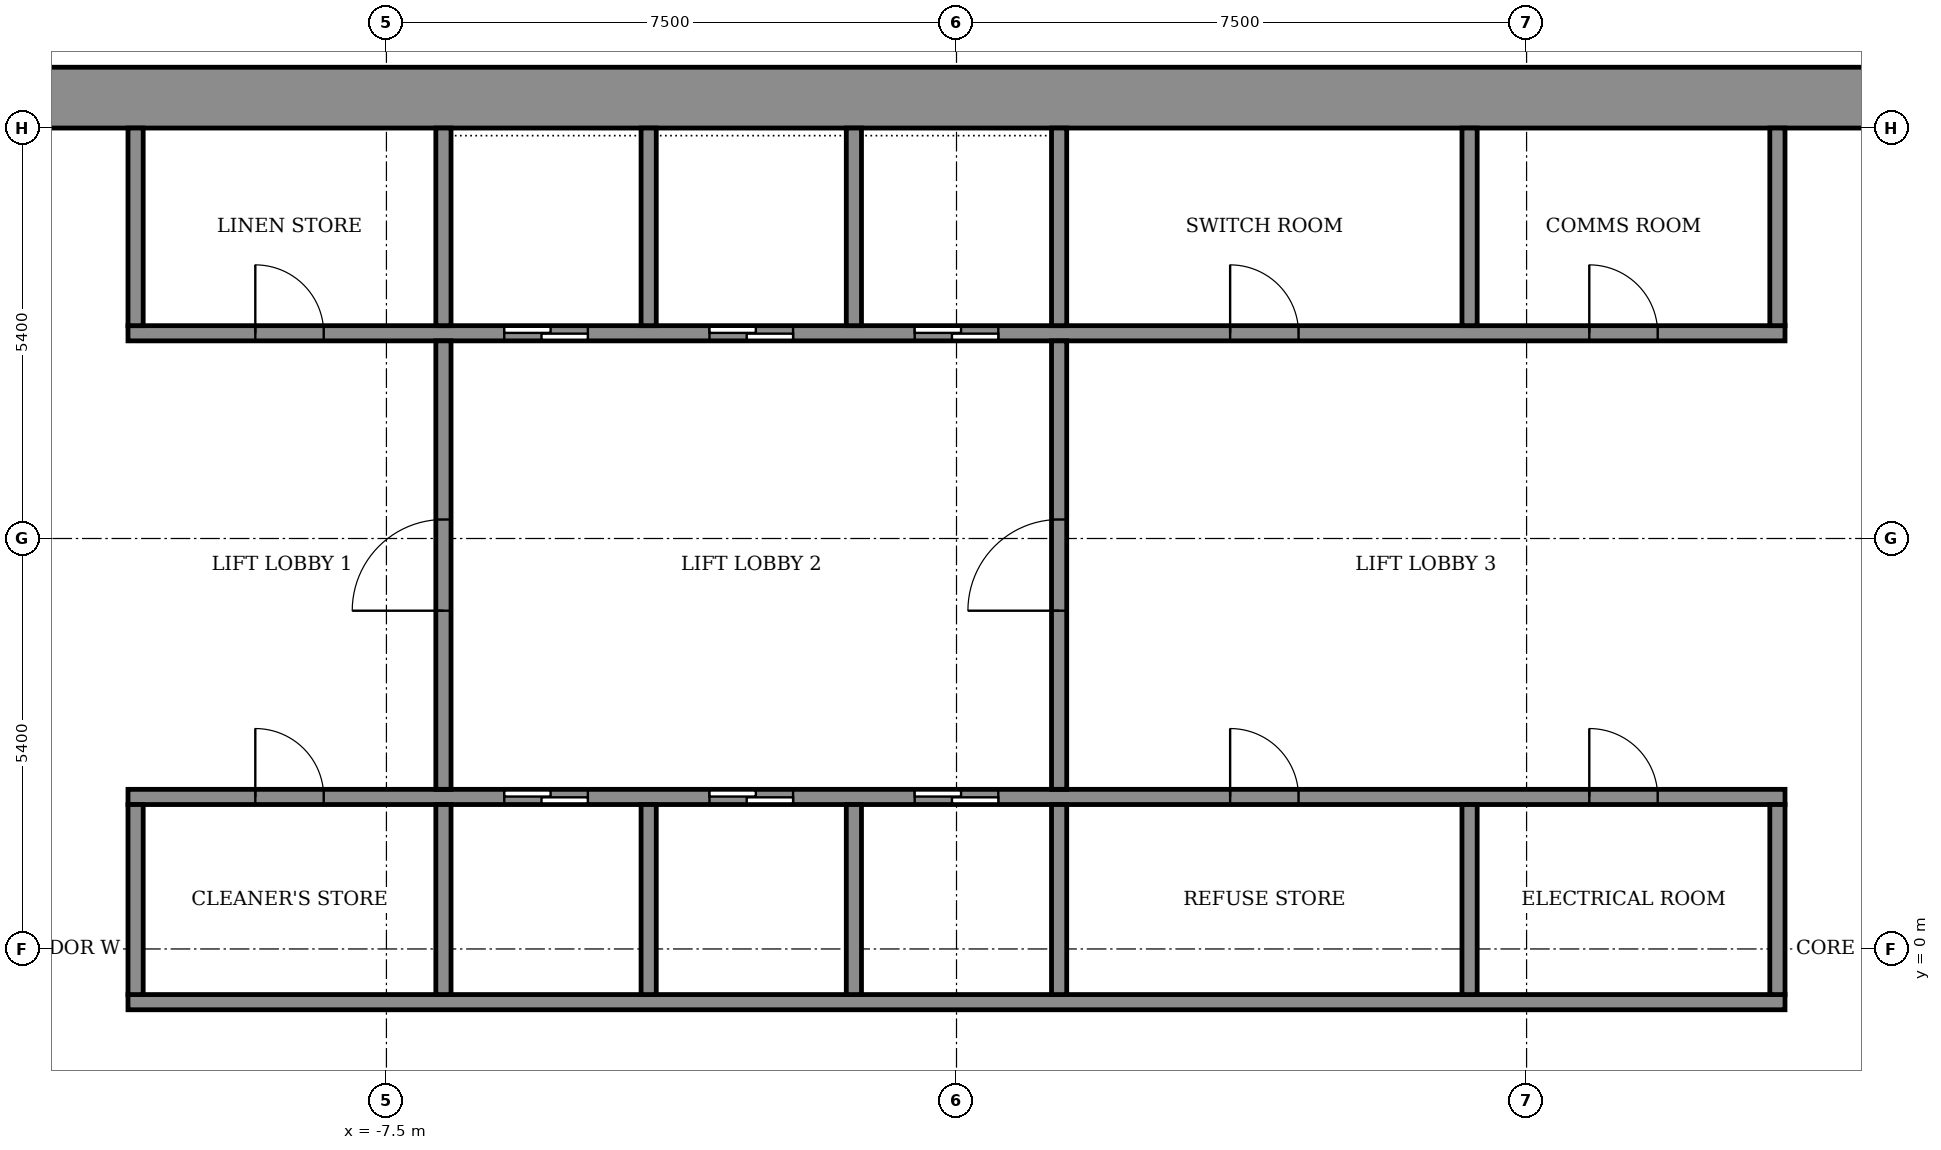
"""IFC4 building model, lengths in metres.
Left out: names, types, materials, properties, quantities, classifications, styles, units other than length and angle.
Written with IfcOpenShell. Run it as: python <this file> out.ifc"""

import sys

from ifc_helpers import new_model, si_unit, direction, frame, frame_2d, origin, place, context, subcontext, project, spatial, rectangle, extrude, element, fill, save


model = new_model("IFC4")
c1 = context("Model", 3, precision=1e-05, world=origin(), true_north=direction((0.0, 1.0)))
c2 = subcontext(c1, "Body", "Model", "MODEL_VIEW")
j1 = project(units=[si_unit("LENGTHUNIT", "METRE"), si_unit("PLANEANGLEUNIT", "RADIAN")], contexts=[c1])
p1 = place(None, origin())
s1 = spatial("IfcSite", under=j1, at=p1, CompositionType="ELEMENT")
p2 = place(p1, origin())
s2 = spatial("IfcBuilding", under=s1, at=p2, CompositionType="ELEMENT")
p3 = place(p2, frame((0.0, 0.0, 241.9)))
s3 = spatial("IfcBuildingStorey", under=s2, at=p3, CompositionType="ELEMENT", Elevation=241.9)
p4 = place(p3, frame((-14.6, 11.2, 0.0), z_axis=(0.0, 0.0, 1.0), x_axis=(1.0, 0.0, 0.0)))
e1 = element("IfcWall", 1, at=p4, inside=s3, PredefinedType="SHEAR", context=c2, shape_type="SweptSolid", body=[
    extrude(rectangle(XDim=29.2, YDim=0.8, at=frame_2d((14.6, 0.0))), origin(), (0.0, 0.0, 1.0), 3.6),
])
p5 = place(p3, frame((-10.9, -0.7, 0.0), z_axis=(0.0, 0.0, 1.0), x_axis=(1.0, 0.0, 0.0)))
e2 = element("IfcWall", 2, at=p5, inside=s3, PredefinedType="SHEAR", context=c2, shape_type="SweptSolid", body=[
    extrude(rectangle(XDim=21.8, YDim=0.2, at=frame_2d((10.9, 0.0))), origin(), (0.0, 0.0, 1.0), 3.05),
])
p6 = place(p3, frame((-10.9, 2.0, 0.0), z_axis=(0.0, 0.0, 1.0), x_axis=(1.0, 0.0, 0.0)))
e3 = element("IfcWall", 3, at=p6, inside=s3, PredefinedType="SHEAR", context=c2, shape_type="SweptSolid", body=[
    extrude(rectangle(XDim=21.8, YDim=0.2, at=frame_2d((10.9, 0.0))), origin(), (0.0, 0.0, 1.0), 3.05),
])
p7 = place(p6, frame((4.95, 0.0, 0.0)))
e4 = element("IfcOpeningElement", 4, at=p7, cuts=e3, PredefinedType="OPENING", context=c2, shape_type="SweptSolid", body=[
    extrude(rectangle(XDim=1.1, YDim=2.1, at=frame_2d((0.55, 1.05))), frame((0.0, 0.11, 0.0), z_axis=(0.0, -1.0, 0.0), x_axis=(1.0, 0.0, 0.0)), (0.0, 0.0, 1.0), 0.22),
])
p8 = place(p6, frame((7.65, 0.0, 0.0)))
e5 = element("IfcOpeningElement", 5, at=p8, cuts=e3, PredefinedType="OPENING", context=c2, shape_type="SweptSolid", body=[
    extrude(rectangle(XDim=1.1, YDim=2.1, at=frame_2d((0.55, 1.05))), frame((0.0, 0.11, 0.0), z_axis=(0.0, -1.0, 0.0), x_axis=(1.0, 0.0, 0.0)), (0.0, 0.0, 1.0), 0.22),
])
p9 = place(p6, frame((10.35, 0.0, 0.0)))
e6 = element("IfcOpeningElement", 6, at=p9, cuts=e3, PredefinedType="OPENING", context=c2, shape_type="SweptSolid", body=[
    extrude(rectangle(XDim=1.1, YDim=2.1, at=frame_2d((0.55, 1.05))), frame((0.0, 0.11, 0.0), z_axis=(0.0, -1.0, 0.0), x_axis=(1.0, 0.0, 0.0)), (0.0, 0.0, 1.0), 0.22),
])
p10 = place(p6, frame((1.675, 0.0, 0.0)))
e7 = element("IfcOpeningElement", 7, at=p10, cuts=e3, PredefinedType="OPENING", context=c2, shape_type="SweptSolid", body=[
    extrude(rectangle(XDim=0.9, YDim=2.1, at=frame_2d((0.45, 1.05))), frame((0.0, 0.11, 0.0), z_axis=(0.0, -1.0, 0.0), x_axis=(1.0, 0.0, 0.0)), (0.0, 0.0, 1.0), 0.22),
])
p11 = place(p6, frame((14.5, 0.0, 0.0)))
e8 = element("IfcOpeningElement", 8, at=p11, cuts=e3, PredefinedType="OPENING", context=c2, shape_type="SweptSolid", body=[
    extrude(rectangle(XDim=0.9, YDim=2.1, at=frame_2d((0.45, 1.05))), frame((0.0, 0.11, 0.0), z_axis=(0.0, -1.0, 0.0), x_axis=(1.0, 0.0, 0.0)), (0.0, 0.0, 1.0), 0.22),
])
p12 = place(p6, frame((19.225, 0.0, 0.0)))
e9 = element("IfcOpeningElement", 9, at=p12, cuts=e3, PredefinedType="OPENING", context=c2, shape_type="SweptSolid", body=[
    extrude(rectangle(XDim=0.9, YDim=2.1, at=frame_2d((0.45, 1.05))), frame((0.0, 0.11, 0.0), z_axis=(0.0, -1.0, 0.0), x_axis=(1.0, 0.0, 0.0)), (0.0, 0.0, 1.0), 0.22),
])
p13 = place(p3, frame((-10.9, 8.1, 0.0), z_axis=(0.0, 0.0, 1.0), x_axis=(1.0, 0.0, 0.0)))
e10 = element("IfcWall", 10, at=p13, inside=s3, PredefinedType="SHEAR", context=c2, shape_type="SweptSolid", body=[
    extrude(rectangle(XDim=21.8, YDim=0.2, at=frame_2d((10.9, 0.0))), origin(), (0.0, 0.0, 1.0), 3.05),
])
p14 = place(p13, frame((4.95, 0.0, 0.0)))
e11 = element("IfcOpeningElement", 11, at=p14, cuts=e10, PredefinedType="OPENING", context=c2, shape_type="SweptSolid", body=[
    extrude(rectangle(XDim=1.1, YDim=2.1, at=frame_2d((0.55, 1.05))), frame((0.0, 0.11, 0.0), z_axis=(0.0, -1.0, 0.0), x_axis=(1.0, 0.0, 0.0)), (0.0, 0.0, 1.0), 0.22),
])
p15 = place(p13, frame((7.65, 0.0, 0.0)))
e12 = element("IfcOpeningElement", 12, at=p15, cuts=e10, PredefinedType="OPENING", context=c2, shape_type="SweptSolid", body=[
    extrude(rectangle(XDim=1.1, YDim=2.1, at=frame_2d((0.55, 1.05))), frame((0.0, 0.11, 0.0), z_axis=(0.0, -1.0, 0.0), x_axis=(1.0, 0.0, 0.0)), (0.0, 0.0, 1.0), 0.22),
])
p16 = place(p13, frame((10.35, 0.0, 0.0)))
e13 = element("IfcOpeningElement", 13, at=p16, cuts=e10, PredefinedType="OPENING", context=c2, shape_type="SweptSolid", body=[
    extrude(rectangle(XDim=1.1, YDim=2.1, at=frame_2d((0.55, 1.05))), frame((0.0, 0.11, 0.0), z_axis=(0.0, -1.0, 0.0), x_axis=(1.0, 0.0, 0.0)), (0.0, 0.0, 1.0), 0.22),
])
p17 = place(p13, frame((1.675, 0.0, 0.0)))
e14 = element("IfcOpeningElement", 14, at=p17, cuts=e10, PredefinedType="OPENING", context=c2, shape_type="SweptSolid", body=[
    extrude(rectangle(XDim=0.9, YDim=2.1, at=frame_2d((0.45, 1.05))), frame((0.0, 0.11, 0.0), z_axis=(0.0, -1.0, 0.0), x_axis=(1.0, 0.0, 0.0)), (0.0, 0.0, 1.0), 0.22),
])
p18 = place(p13, frame((14.5, 0.0, 0.0)))
e15 = element("IfcOpeningElement", 15, at=p18, cuts=e10, PredefinedType="OPENING", context=c2, shape_type="SweptSolid", body=[
    extrude(rectangle(XDim=0.9, YDim=2.1, at=frame_2d((0.45, 1.05))), frame((0.0, 0.11, 0.0), z_axis=(0.0, -1.0, 0.0), x_axis=(1.0, 0.0, 0.0)), (0.0, 0.0, 1.0), 0.22),
])
p19 = place(p13, frame((19.225, 0.0, 0.0)))
e16 = element("IfcOpeningElement", 16, at=p19, cuts=e10, PredefinedType="OPENING", context=c2, shape_type="SweptSolid", body=[
    extrude(rectangle(XDim=0.9, YDim=2.1, at=frame_2d((0.45, 1.05))), frame((0.0, 0.11, 0.0), z_axis=(0.0, -1.0, 0.0), x_axis=(1.0, 0.0, 0.0)), (0.0, 0.0, 1.0), 0.22),
])
p20 = place(p3, frame((-10.8, -0.6, 0.0), z_axis=(0.0, 0.0, 1.0), x_axis=(0.0, 1.0, 0.0)))
e17 = element("IfcWall", 17, at=p20, inside=s3, PredefinedType="STANDARD", context=c2, shape_type="SweptSolid", body=[
    extrude(rectangle(XDim=2.5, YDim=0.2, at=frame_2d((1.25, 0.0))), origin(), (0.0, 0.0, 1.0), 3.05),
])
for number, where, z_axis, x_axis in (
    (18, (-6.75, -0.6, 0.0), (0.0, 0.0, 1.0), (0.0, 1.0, 0.0)),
    (19, (-4.05, -0.6, 0.0), (0.0, 0.0, 1.0), (0.0, 1.0, 0.0)),
    (20, (-1.35, -0.6, 0.0), (0.0, 0.0, 1.0), (0.0, 1.0, 0.0)),
    (21, (1.35, -0.6, 0.0), (0.0, 0.0, 1.0), (0.0, 1.0, 0.0)),
):
    element("IfcWall", number, at=place(p3, frame(where, z_axis=z_axis, x_axis=x_axis)), inside=s3, PredefinedType="SHEAR", context=c2, shape_type="SweptSolid", body=[
        extrude(rectangle(XDim=2.5, YDim=0.2, at=frame_2d((1.25, 0.0))), origin(), (0.0, 0.0, 1.0), 3.05),
    ])
for number, where, z_axis, x_axis in (
    (22, (6.75, -0.6, 0.0), (0.0, 0.0, 1.0), (0.0, 1.0, 0.0)),
    (23, (10.8, -0.6, 0.0), (0.0, 0.0, 1.0), (0.0, 1.0, 0.0)),
):
    element("IfcWall", number, at=place(p3, frame(where, z_axis=z_axis, x_axis=x_axis)), inside=s3, PredefinedType="STANDARD", context=c2, shape_type="SweptSolid", body=[
        extrude(rectangle(XDim=2.5, YDim=0.2, at=frame_2d((1.25, 0.0))), origin(), (0.0, 0.0, 1.0), 3.05),
    ])
p21 = place(p3, frame((-10.8, 8.2, 0.0), z_axis=(0.0, 0.0, 1.0), x_axis=(0.0, 1.0, 0.0)))
e24 = element("IfcWall", 24, at=p21, inside=s3, PredefinedType="STANDARD", context=c2, shape_type="SweptSolid", body=[
    extrude(rectangle(XDim=2.6, YDim=0.2, at=frame_2d((1.3, 0.0))), origin(), (0.0, 0.0, 1.0), 3.05),
])
for number, where, z_axis, x_axis in (
    (25, (-6.75, 8.2, 0.0), (0.0, 0.0, 1.0), (0.0, 1.0, 0.0)),
    (26, (-4.05, 8.2, 0.0), (0.0, 0.0, 1.0), (0.0, 1.0, 0.0)),
    (27, (-1.35, 8.2, 0.0), (0.0, 0.0, 1.0), (0.0, 1.0, 0.0)),
    (28, (1.35, 8.2, 0.0), (0.0, 0.0, 1.0), (0.0, 1.0, 0.0)),
):
    element("IfcWall", number, at=place(p3, frame(where, z_axis=z_axis, x_axis=x_axis)), inside=s3, PredefinedType="SHEAR", context=c2, shape_type="SweptSolid", body=[
        extrude(rectangle(XDim=2.6, YDim=0.2, at=frame_2d((1.3, 0.0))), origin(), (0.0, 0.0, 1.0), 3.05),
    ])
for number, where, z_axis, x_axis in (
    (29, (6.75, 8.2, 0.0), (0.0, 0.0, 1.0), (0.0, 1.0, 0.0)),
    (30, (10.8, 8.2, 0.0), (0.0, 0.0, 1.0), (0.0, 1.0, 0.0)),
):
    element("IfcWall", number, at=place(p3, frame(where, z_axis=z_axis, x_axis=x_axis)), inside=s3, PredefinedType="STANDARD", context=c2, shape_type="SweptSolid", body=[
        extrude(rectangle(XDim=2.6, YDim=0.2, at=frame_2d((1.3, 0.0))), origin(), (0.0, 0.0, 1.0), 3.05),
    ])
p22 = place(p3, frame((-6.75, 2.1, 0.0), z_axis=(0.0, 0.0, 1.0), x_axis=(0.0, 1.0, 0.0)))
e31 = element("IfcWall", 31, at=p22, inside=s3, PredefinedType="STANDARD", context=c2, shape_type="SweptSolid", body=[
    extrude(rectangle(XDim=5.9, YDim=0.2, at=frame_2d((2.95, 0.0))), origin(), (0.0, 0.0, 1.0), 3.05),
])
p23 = place(p22, frame((2.35, 0.0, 0.0)))
e32 = element("IfcOpeningElement", 32, at=p23, cuts=e31, PredefinedType="OPENING", context=c2, shape_type="SweptSolid", body=[
    extrude(rectangle(XDim=1.2, YDim=2.1, at=frame_2d((0.6, 1.05))), frame((0.0, 0.11, 0.0), z_axis=(0.0, -1.0, 0.0), x_axis=(1.0, 0.0, 0.0)), (0.0, 0.0, 1.0), 0.22),
])
p24 = place(p3, frame((1.35, 2.1, 0.0), z_axis=(0.0, 0.0, 1.0), x_axis=(0.0, 1.0, 0.0)))
e33 = element("IfcWall", 33, at=p24, inside=s3, PredefinedType="STANDARD", context=c2, shape_type="SweptSolid", body=[
    extrude(rectangle(XDim=5.9, YDim=0.2, at=frame_2d((2.95, 0.0))), origin(), (0.0, 0.0, 1.0), 3.05),
])
p25 = place(p24, frame((2.35, 0.0, 0.0)))
e34 = element("IfcOpeningElement", 34, at=p25, cuts=e33, PredefinedType="OPENING", context=c2, shape_type="SweptSolid", body=[
    extrude(rectangle(XDim=1.2, YDim=2.1, at=frame_2d((0.6, 1.05))), frame((0.0, 0.11, 0.0), z_axis=(0.0, -1.0, 0.0), x_axis=(1.0, 0.0, 0.0)), (0.0, 0.0, 1.0), 0.22),
])
p26 = place(p7, origin())
e35 = element("IfcDoor", 35, at=p26, inside=s3, OperationType="SLIDING_TO_LEFT", PredefinedType="DOOR", context=c2, shape_type="SweptSolid", body=[
    extrude(rectangle(XDim=1.1, YDim=2.1, at=frame_2d((0.55, 1.05))), frame((0.0, 0.025, 0.0), z_axis=(0.0, -1.0, 0.0), x_axis=(1.0, 0.0, 0.0)), (0.0, 0.0, 1.0), 0.05),
])
fill(e4, e35)
p27 = place(p8, origin())
e36 = element("IfcDoor", 36, at=p27, inside=s3, OperationType="SLIDING_TO_LEFT", PredefinedType="DOOR", context=c2, shape_type="SweptSolid", body=[
    extrude(rectangle(XDim=1.1, YDim=2.1, at=frame_2d((0.55, 1.05))), frame((0.0, 0.025, 0.0), z_axis=(0.0, -1.0, 0.0), x_axis=(1.0, 0.0, 0.0)), (0.0, 0.0, 1.0), 0.05),
])
fill(e5, e36)
p28 = place(p9, origin())
e37 = element("IfcDoor", 37, at=p28, inside=s3, OperationType="SLIDING_TO_LEFT", PredefinedType="DOOR", context=c2, shape_type="SweptSolid", body=[
    extrude(rectangle(XDim=1.1, YDim=2.1, at=frame_2d((0.55, 1.05))), frame((0.0, 0.025, 0.0), z_axis=(0.0, -1.0, 0.0), x_axis=(1.0, 0.0, 0.0)), (0.0, 0.0, 1.0), 0.05),
])
fill(e6, e37)
p29 = place(p14, origin())
e38 = element("IfcDoor", 38, at=p29, inside=s3, OperationType="SLIDING_TO_LEFT", PredefinedType="DOOR", context=c2, shape_type="SweptSolid", body=[
    extrude(rectangle(XDim=1.1, YDim=2.1, at=frame_2d((0.55, 1.05))), frame((0.0, 0.025, 0.0), z_axis=(0.0, -1.0, 0.0), x_axis=(1.0, 0.0, 0.0)), (0.0, 0.0, 1.0), 0.05),
])
fill(e11, e38)
p30 = place(p15, origin())
e39 = element("IfcDoor", 39, at=p30, inside=s3, OperationType="SLIDING_TO_LEFT", PredefinedType="DOOR", context=c2, shape_type="SweptSolid", body=[
    extrude(rectangle(XDim=1.1, YDim=2.1, at=frame_2d((0.55, 1.05))), frame((0.0, 0.025, 0.0), z_axis=(0.0, -1.0, 0.0), x_axis=(1.0, 0.0, 0.0)), (0.0, 0.0, 1.0), 0.05),
])
fill(e12, e39)
p31 = place(p16, origin())
e40 = element("IfcDoor", 40, at=p31, inside=s3, OperationType="SLIDING_TO_LEFT", PredefinedType="DOOR", context=c2, shape_type="SweptSolid", body=[
    extrude(rectangle(XDim=1.1, YDim=2.1, at=frame_2d((0.55, 1.05))), frame((0.0, 0.025, 0.0), z_axis=(0.0, -1.0, 0.0), x_axis=(1.0, 0.0, 0.0)), (0.0, 0.0, 1.0), 0.05),
])
fill(e13, e40)
p32 = place(p10, origin())
e41 = element("IfcDoor", 41, at=p32, inside=s3, OperationType="SINGLE_SWING_RIGHT", PredefinedType="DOOR", context=c2, shape_type="SweptSolid", body=[
    extrude(rectangle(XDim=0.9, YDim=2.1, at=frame_2d((0.45, 1.05))), frame((0.0, 0.025, 0.0), z_axis=(0.0, -1.0, 0.0), x_axis=(1.0, 0.0, 0.0)), (0.0, 0.0, 1.0), 0.05),
])
fill(e7, e41)
p33 = place(p11, origin())
e42 = element("IfcDoor", 42, at=p33, inside=s3, OperationType="SINGLE_SWING_RIGHT", PredefinedType="DOOR", context=c2, shape_type="SweptSolid", body=[
    extrude(rectangle(XDim=0.9, YDim=2.1, at=frame_2d((0.45, 1.05))), frame((0.0, 0.025, 0.0), z_axis=(0.0, -1.0, 0.0), x_axis=(1.0, 0.0, 0.0)), (0.0, 0.0, 1.0), 0.05),
])
fill(e8, e42)
p34 = place(p12, origin())
e43 = element("IfcDoor", 43, at=p34, inside=s3, OperationType="SINGLE_SWING_LEFT", PredefinedType="DOOR", context=c2, shape_type="SweptSolid", body=[
    extrude(rectangle(XDim=0.9, YDim=2.1, at=frame_2d((0.45, 1.05))), frame((0.0, 0.025, 0.0), z_axis=(0.0, -1.0, 0.0), x_axis=(1.0, 0.0, 0.0)), (0.0, 0.0, 1.0), 0.05),
])
fill(e9, e43)
p35 = place(p17, origin())
e44 = element("IfcDoor", 44, at=p35, inside=s3, OperationType="SINGLE_SWING_RIGHT", PredefinedType="DOOR", context=c2, shape_type="SweptSolid", body=[
    extrude(rectangle(XDim=0.9, YDim=2.1, at=frame_2d((0.45, 1.05))), frame((0.0, 0.025, 0.0), z_axis=(0.0, -1.0, 0.0), x_axis=(1.0, 0.0, 0.0)), (0.0, 0.0, 1.0), 0.05),
])
fill(e14, e44)
p36 = place(p18, origin())
e45 = element("IfcDoor", 45, at=p36, inside=s3, OperationType="SINGLE_SWING_LEFT", PredefinedType="DOOR", context=c2, shape_type="SweptSolid", body=[
    extrude(rectangle(XDim=0.9, YDim=2.1, at=frame_2d((0.45, 1.05))), frame((0.0, 0.025, 0.0), z_axis=(0.0, -1.0, 0.0), x_axis=(1.0, 0.0, 0.0)), (0.0, 0.0, 1.0), 0.05),
])
fill(e15, e45)
p37 = place(p19, origin())
e46 = element("IfcDoor", 46, at=p37, inside=s3, OperationType="SINGLE_SWING_LEFT", PredefinedType="DOOR", context=c2, shape_type="SweptSolid", body=[
    extrude(rectangle(XDim=0.9, YDim=2.1, at=frame_2d((0.45, 1.05))), frame((0.0, 0.025, 0.0), z_axis=(0.0, -1.0, 0.0), x_axis=(1.0, 0.0, 0.0)), (0.0, 0.0, 1.0), 0.05),
])
fill(e16, e46)
p38 = place(p23, origin())
e47 = element("IfcDoor", 47, at=p38, inside=s3, OperationType="SINGLE_SWING_LEFT", PredefinedType="DOOR", context=c2, shape_type="SweptSolid", body=[
    extrude(rectangle(XDim=1.2, YDim=2.1, at=frame_2d((0.6, 1.05))), frame((0.0, 0.025, 0.0), z_axis=(0.0, -1.0, 0.0), x_axis=(1.0, 0.0, 0.0)), (0.0, 0.0, 1.0), 0.05),
])
fill(e32, e47)
p39 = place(p25, origin())
e48 = element("IfcDoor", 48, at=p39, inside=s3, OperationType="SINGLE_SWING_LEFT", PredefinedType="DOOR", context=c2, shape_type="SweptSolid", body=[
    extrude(rectangle(XDim=1.2, YDim=2.1, at=frame_2d((0.6, 1.05))), frame((0.0, 0.025, 0.0), z_axis=(0.0, -1.0, 0.0), x_axis=(1.0, 0.0, 0.0)), (0.0, 0.0, 1.0), 0.05),
])
fill(e34, e48)
save(model, sys.argv[1])
